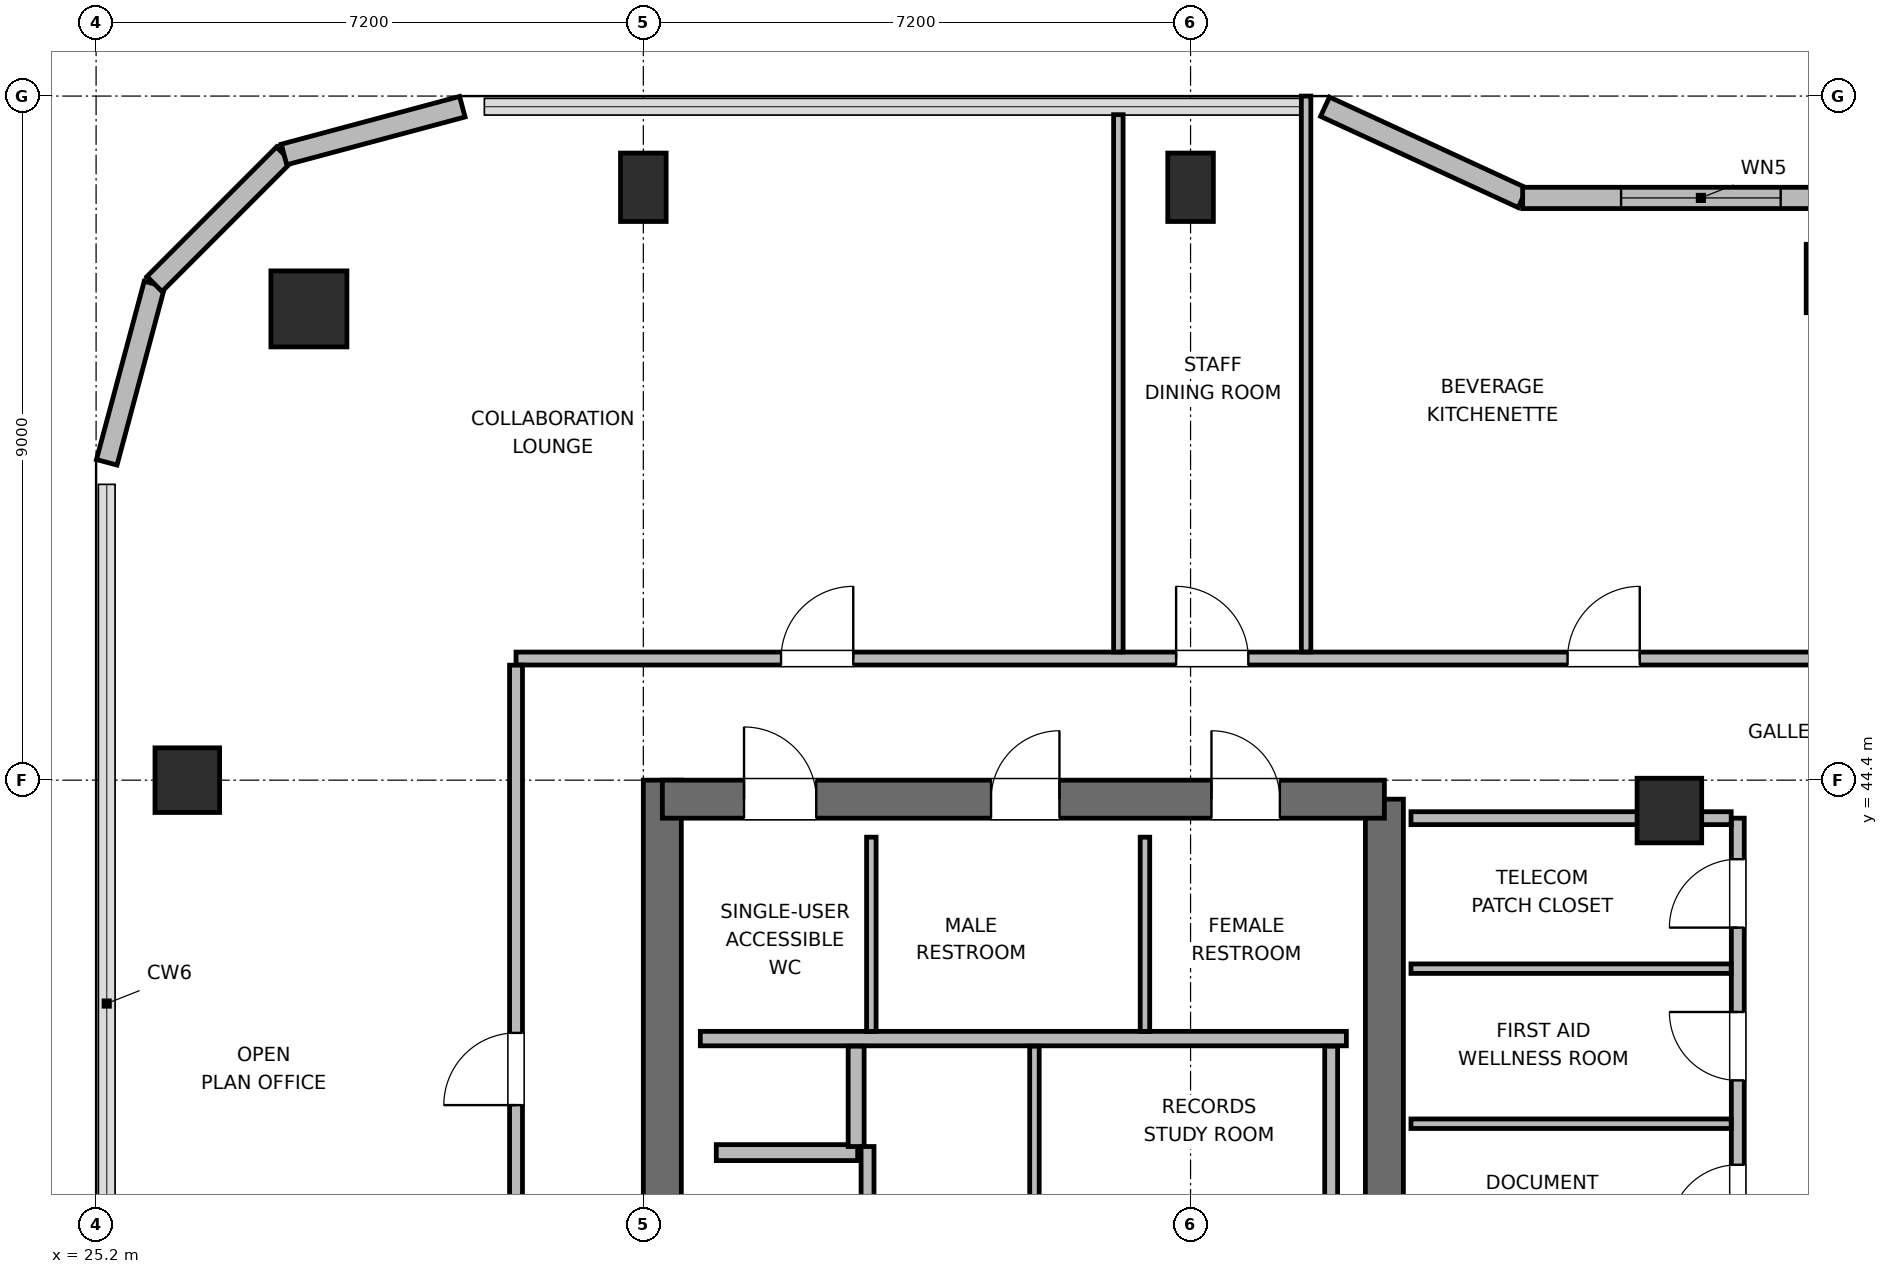
"""IFC4 building model, lengths in metres.
Left out: names, types, materials, properties, quantities, classifications, styles, units other than length and angle.
Written with IfcOpenShell. Run it as: python <this file> out.ifc"""

import sys

from ifc_helpers import new_model, si_unit, direction, frame, frame_2d, origin, origin_2d, place, context, subcontext, project, spatial, rectangle, circle, extrude, element, fill, save


model = new_model("IFC4")
c1 = context("Model", 3, precision=1e-05, world=origin(), true_north=direction((0.0, 1.0)))
c2 = subcontext(c1, "Body", "Model", "MODEL_VIEW")
j1 = project(units=[si_unit("LENGTHUNIT", "METRE"), si_unit("PLANEANGLEUNIT", "RADIAN")], contexts=[c1])
p1 = place(None, origin())
s1 = spatial("IfcSite", under=j1, at=p1, CompositionType="ELEMENT")
p2 = place(p1, origin())
s2 = spatial("IfcBuilding", under=s1, at=p2, CompositionType="ELEMENT")
p3 = place(p2, frame((0.0, 0.0, 350.4)))
s3 = spatial("IfcBuildingStorey", under=s2, at=p3, CompositionType="ELEMENT", Elevation=350.4)
p4 = place(p3, frame((32.65, 27.6, 0.0), z_axis=(0.0, 0.0, 1.0), x_axis=(0.0, 1.0, 0.0)))
e1 = element("IfcWall", 1, at=p4, inside=s3, PredefinedType="SHEAR", context=c2, shape_type="SweptSolid", body=[
    extrude(rectangle(XDim=16.8, YDim=0.5, at=frame_2d((8.4, 0.0))), origin(), (0.0, 0.0, 1.0), 4.5),
])
p5 = place(p3, frame((42.15, 37.8, 0.0), z_axis=(0.0, 0.0, 1.0), x_axis=(0.0, 1.0, 0.0)))
e2 = element("IfcWall", 2, at=p5, inside=s3, PredefinedType="SHEAR", context=c2, shape_type="SweptSolid", body=[
    extrude(rectangle(XDim=6.35, YDim=0.5, at=frame_2d((3.175, 0.0))), origin(), (0.0, 0.0, 1.0), 4.5),
])
p6 = place(p3, frame((32.65, 44.15, 0.0), z_axis=(0.0, 0.0, 1.0), x_axis=(1.0, 0.0, 0.0)))
e3 = element("IfcWall", 3, at=p6, inside=s3, PredefinedType="SHEAR", context=c2, shape_type="SweptSolid", body=[
    extrude(rectangle(XDim=9.5, YDim=0.5, at=frame_2d((4.75, 0.0))), origin(), (0.0, 0.0, 1.0), 4.5),
])
p7 = place(p6, frame((1.075, 0.0, 0.0)))
e4 = element("IfcOpeningElement", 4, at=p7, cuts=e3, PredefinedType="OPENING", context=c2, shape_type="SweptSolid", body=[
    extrude(rectangle(XDim=0.95, YDim=2.04, at=frame_2d((0.475, 1.02))), frame((0.0, 0.26, 0.0), z_axis=(0.0, -1.0, 0.0), x_axis=(1.0, 0.0, 0.0)), (0.0, 0.0, 1.0), 0.52),
])
p8 = place(p6, frame((4.325, 0.0, 0.0)))
e5 = element("IfcOpeningElement", 5, at=p8, cuts=e3, PredefinedType="OPENING", context=c2, shape_type="SweptSolid", body=[
    extrude(rectangle(XDim=0.9, YDim=2.02, at=frame_2d((0.45, 1.01))), frame((0.0, 0.26, 0.0), z_axis=(0.0, -1.0, 0.0), x_axis=(1.0, 0.0, 0.0)), (0.0, 0.0, 1.0), 0.52),
])
p9 = place(p6, frame((7.225, 0.0, 0.0)))
e6 = element("IfcOpeningElement", 6, at=p9, cuts=e3, PredefinedType="OPENING", context=c2, shape_type="SweptSolid", body=[
    extrude(rectangle(XDim=0.9, YDim=2.02, at=frame_2d((0.45, 1.01))), frame((0.0, 0.26, 0.0), z_axis=(0.0, -1.0, 0.0), x_axis=(1.0, 0.0, 0.0)), (0.0, 0.0, 1.0), 0.52),
])
p10 = place(p3, frame((28.0, 50.6, 0.0), z_axis=(0.0, 0.0, 1.0), x_axis=(1.0, 0.0, 0.0)))
e7 = element("IfcColumn", 7, at=p10, inside=s3, PredefinedType="COLUMN", context=c2, shape_type="SweptSolid", body=[
    extrude(circle(Radius=0.5, at=origin_2d()), origin(), (0.0, 0.0, 1.0), 4.5),
])
for number, where, z_axis, x_axis in (
    (8, (32.4, 52.2, 0.0), (0.0, 0.0, 1.0), (1.0, 0.0, 0.0)),
    (9, (39.6, 52.2, 0.0), (0.0, 0.0, 1.0), (1.0, 0.0, 0.0)),
    (10, (48.0, 51.0, 0.0), (0.0, 0.0, 1.0), (1.0, 0.0, 0.0)),
):
    element("IfcColumn", number, at=place(p3, frame(where, z_axis=z_axis, x_axis=x_axis)), inside=s3, PredefinedType="COLUMN", context=c2, shape_type="SweptSolid", body=[
        extrude(rectangle(XDim=0.6, YDim=0.9, at=origin_2d()), origin(), (0.0, 0.0, 1.0), 4.5),
    ])
for number, where, z_axis, x_axis in (
    (11, (26.4, 44.4, 0.0), (0.0, 0.0, 1.0), (1.0, 0.0, 0.0)),
    (12, (45.9, 44.0, 0.0), (0.0, 0.0, 1.0), (1.0, 0.0, 0.0)),
):
    element("IfcColumn", number, at=place(p3, frame(where, z_axis=z_axis, x_axis=x_axis)), inside=s3, PredefinedType="COLUMN", context=c2, shape_type="SweptSolid", body=[
        extrude(rectangle(XDim=0.85, YDim=0.85, at=origin_2d()), origin(), (0.0, 0.0, 1.0), 4.5),
    ])
p11 = place(p3, frame((25.34, 48.582, 0.0), z_axis=(0.0, 0.0, 1.0), x_axis=(0.258751159445, 0.965944013639, 0.0)))
e13 = element("IfcWall", 13, at=p11, inside=s3, PredefinedType="SOLIDWALL", context=c2, shape_type="SweptSolid", body=[
    extrude(rectangle(XDim=2.429, YDim=0.28, at=frame_2d((1.214, 0.0))), origin(), (0.0, 0.0, 1.0), 2.695),
])
p12 = place(p3, frame((25.969, 50.927, 0.0), z_axis=(0.0, 0.0, 1.0), x_axis=(0.707106781187, 0.707106781187, 0.0)))
e14 = element("IfcWall", 14, at=p12, inside=s3, PredefinedType="SOLIDWALL", context=c2, shape_type="SweptSolid", body=[
    extrude(rectangle(XDim=2.41, YDim=0.28, at=frame_2d((1.205, 0.0))), origin(), (0.0, 0.0, 1.0), 2.695),
])
p13 = place(p3, frame((27.673, 52.632, 0.0), z_axis=(0.0, 0.0, 1.0), x_axis=(0.965937282298, 0.25877628691, 0.0)))
e15 = element("IfcWall", 15, at=p13, inside=s3, PredefinedType="SOLIDWALL", context=c2, shape_type="SweptSolid", body=[
    extrude(rectangle(XDim=2.428, YDim=0.28, at=frame_2d((1.214, 0.0))), origin(), (0.0, 0.0, 1.0), 4.2),
])
p14 = place(p3, frame((41.369, 53.26, 0.0), z_axis=(0.0, 0.0, 1.0), x_axis=(0.907956889006, -0.419063584324, 0.0)))
e16 = element("IfcWall", 16, at=p14, inside=s3, PredefinedType="SOLIDWALL", context=c2, shape_type="SweptSolid", body=[
    extrude(rectangle(XDim=2.864, YDim=0.28, at=frame_2d((1.432, 0.0))), origin(), (0.0, 0.0, 1.0), 2.735),
])
p15 = place(p3, frame((43.969, 52.06, 0.0), z_axis=(0.0, 0.0, 1.0), x_axis=(1.0, 0.0, 0.0)))
e17 = element("IfcWall", 17, at=p15, inside=s3, PredefinedType="SOLIDWALL", context=c2, shape_type="SweptSolid", body=[
    extrude(rectangle(XDim=4.691, YDim=0.28, at=frame_2d((2.345, 0.0))), origin(), (0.0, 0.0, 1.0), 2.735),
])
p16 = place(p15, frame((1.295, 0.0, 0.85)))
e18 = element("IfcOpeningElement", 18, at=p16, cuts=e17, PredefinedType="OPENING", context=c2, shape_type="SweptSolid", body=[
    extrude(rectangle(XDim=2.1, YDim=1.05, at=frame_2d((1.05, 0.525))), frame((0.0, 0.15, 0.0), z_axis=(0.0, -1.0, 0.0), x_axis=(1.0, 0.0, 0.0)), (0.0, 0.0, 1.0), 0.3),
])
p17 = place(p3, frame((33.15, 41.0, 0.0), z_axis=(0.0, 0.0, 1.0), x_axis=(1.0, 0.0, 0.0)))
e19 = element("IfcWall", 19, at=p17, inside=s3, PredefinedType="PLUMBINGWALL", context=c2, shape_type="SweptSolid", body=[
    extrude(rectangle(XDim=8.5, YDim=0.19, at=frame_2d((4.25, 0.0))), origin(), (0.0, 0.0, 1.0), 4.2),
])
for number, where, z_axis, x_axis in (
    (20, (35.4, 41.095, 0.0), (0.0, 0.0, 1.0), (0.0, 1.0, 0.0)),
    (21, (39.0, 41.095, 0.0), (0.0, 0.0, 1.0), (0.0, 1.0, 0.0)),
):
    element("IfcWall", number, at=place(p3, frame(where, z_axis=z_axis, x_axis=x_axis)), inside=s3, PredefinedType="PARTITIONING", context=c2, shape_type="SweptSolid", body=[
        extrude(rectangle(XDim=2.555, YDim=0.125, at=frame_2d((1.277, 0.0))), origin(), (0.0, 0.0, 1.0), 4.2),
    ])
p18 = place(p3, frame((33.36, 39.5, 0.0), z_axis=(0.0, 0.0, 1.0), x_axis=(1.0, 0.0, 0.0)))
e22 = element("IfcWall", 22, at=p18, inside=s3, PredefinedType="PARTITIONING", context=c2, shape_type="SweptSolid", body=[
    extrude(rectangle(XDim=1.86, YDim=0.21, at=frame_2d((0.93, 0.0))), origin(), (0.0, 0.0, 1.0), 4.2),
])
p19 = place(p3, frame((35.2, 39.58, 0.0), z_axis=(0.0, 0.0, 1.0), x_axis=(0.0, 1.0, 0.0)))
e23 = element("IfcWall", 23, at=p19, inside=s3, PredefinedType="PARTITIONING", context=c2, shape_type="SweptSolid", body=[
    extrude(rectangle(XDim=1.32, YDim=0.21, at=frame_2d((0.66, 0.0))), origin(), (0.0, 0.0, 1.0), 4.2),
])
p20 = place(p3, frame((35.35, 38.087, 0.0), z_axis=(0.0, 0.0, 1.0), x_axis=(0.0, 1.0, 0.0)))
e24 = element("IfcWall", 24, at=p20, inside=s3, PredefinedType="PARTITIONING", context=c2, shape_type="SweptSolid", body=[
    extrude(rectangle(XDim=1.493, YDim=0.17, at=frame_2d((0.747, 0.0))), origin(), (0.0, 0.0, 1.0), 4.2),
])
p21 = place(p3, frame((41.45, 38.087, 0.0), z_axis=(0.0, 0.0, 1.0), x_axis=(0.0, 1.0, 0.0)))
e25 = element("IfcWall", 25, at=p21, inside=s3, PredefinedType="PARTITIONING", context=c2, shape_type="SweptSolid", body=[
    extrude(rectangle(XDim=2.813, YDim=0.17, at=frame_2d((1.406, 0.0))), origin(), (0.0, 0.0, 1.0), 4.2),
])
p22 = place(p3, frame((37.546, 38.087, 0.0), z_axis=(0.0, 0.0, 1.0), x_axis=(0.0, 1.0, 0.0)))
e26 = element("IfcWall", 26, at=p22, inside=s3, PredefinedType="PARTITIONING", context=c2, shape_type="SweptSolid", body=[
    extrude(rectangle(XDim=2.813, YDim=0.125, at=frame_2d((1.406, 0.0))), origin(), (0.0, 0.0, 1.0), 4.2),
])
p23 = place(p3, frame((46.8, 37.9, 0.0), z_axis=(0.0, 0.0, 1.0), x_axis=(0.0, 1.0, 0.0)))
e27 = element("IfcWall", 27, at=p23, inside=s3, PredefinedType="PARTITIONING", context=c2, shape_type="SweptSolid", body=[
    extrude(rectangle(XDim=6.0, YDim=0.17, at=frame_2d((3.0, 0.0))), origin(), (0.0, 0.0, 1.0), 4.2),
])
p24 = place(p23, frame((0.54, 0.0, 0.0)))
e28 = element("IfcOpeningElement", 28, at=p24, cuts=e27, PredefinedType="OPENING", context=c2, shape_type="SweptSolid", body=[
    extrude(rectangle(XDim=0.9, YDim=2.02, at=frame_2d((0.45, 1.01))), frame((0.0, 0.095, 0.0), z_axis=(0.0, -1.0, 0.0), x_axis=(1.0, 0.0, 0.0)), (0.0, 0.0, 1.0), 0.19),
])
p25 = place(p23, frame((2.55, 0.0, 0.0)))
e29 = element("IfcOpeningElement", 29, at=p25, cuts=e27, PredefinedType="OPENING", context=c2, shape_type="SweptSolid", body=[
    extrude(rectangle(XDim=0.9, YDim=2.02, at=frame_2d((0.45, 1.01))), frame((0.0, 0.095, 0.0), z_axis=(0.0, -1.0, 0.0), x_axis=(1.0, 0.0, 0.0)), (0.0, 0.0, 1.0), 0.19),
])
p26 = place(p23, frame((4.56, 0.0, 0.0)))
e30 = element("IfcOpeningElement", 30, at=p26, cuts=e27, PredefinedType="OPENING", context=c2, shape_type="SweptSolid", body=[
    extrude(rectangle(XDim=0.9, YDim=2.02, at=frame_2d((0.45, 1.01))), frame((0.0, 0.095, 0.0), z_axis=(0.0, -1.0, 0.0), x_axis=(1.0, 0.0, 0.0)), (0.0, 0.0, 1.0), 0.19),
])
p27 = place(p3, frame((42.5, 43.9, 0.0), z_axis=(0.0, 0.0, 1.0), x_axis=(1.0, 0.0, 0.0)))
e31 = element("IfcWall", 31, at=p27, inside=s3, PredefinedType="PARTITIONING", context=c2, shape_type="SweptSolid", body=[
    extrude(rectangle(XDim=4.213, YDim=0.17, at=frame_2d((2.106, 0.0))), origin(), (0.0, 0.0, 1.0), 3.285),
])
for number, where, z_axis, x_axis in (
    (32, (42.5, 39.88, 0.0), (0.0, 0.0, 1.0), (1.0, 0.0, 0.0)),
    (33, (42.5, 41.92, 0.0), (0.0, 0.0, 1.0), (1.0, 0.0, 0.0)),
):
    element("IfcWall", number, at=place(p3, frame(where, z_axis=z_axis, x_axis=x_axis)), inside=s3, PredefinedType="PARTITIONING", context=c2, shape_type="SweptSolid", body=[
        extrude(rectangle(XDim=4.213, YDim=0.125, at=frame_2d((2.106, 0.0))), origin(), (0.0, 0.0, 1.0), 4.2),
    ])
p28 = place(p3, frame((30.725, 46.0, 0.0), z_axis=(0.0, 0.0, 1.0), x_axis=(1.0, 0.0, 0.0)))
e34 = element("IfcWall", 34, at=p28, inside=s3, PredefinedType="PARTITIONING", context=c2, shape_type="SweptSolid", body=[
    extrude(rectangle(XDim=32.875, YDim=0.17, at=frame_2d((16.438, 0.0))), origin(), (0.0, 0.0, 1.0), 4.2),
])
p29 = place(p28, frame((3.487, 0.0, 0.0)))
e35 = element("IfcOpeningElement", 35, at=p29, cuts=e34, PredefinedType="OPENING", context=c2, shape_type="SweptSolid", body=[
    extrude(rectangle(XDim=0.95, YDim=2.04, at=frame_2d((0.475, 1.02))), frame((0.0, 0.095, 0.0), z_axis=(0.0, -1.0, 0.0), x_axis=(1.0, 0.0, 0.0)), (0.0, 0.0, 1.0), 0.19),
])
p30 = place(p28, frame((8.685, 0.0, 0.0)))
e36 = element("IfcOpeningElement", 36, at=p30, cuts=e34, PredefinedType="OPENING", context=c2, shape_type="SweptSolid", body=[
    extrude(rectangle(XDim=0.95, YDim=2.04, at=frame_2d((0.475, 1.02))), frame((0.0, 0.095, 0.0), z_axis=(0.0, -1.0, 0.0), x_axis=(1.0, 0.0, 0.0)), (0.0, 0.0, 1.0), 0.19),
])
p31 = place(p28, frame((13.835, 0.0, 0.0)))
e37 = element("IfcOpeningElement", 37, at=p31, cuts=e34, PredefinedType="OPENING", context=c2, shape_type="SweptSolid", body=[
    extrude(rectangle(XDim=0.95, YDim=2.04, at=frame_2d((0.475, 1.02))), frame((0.0, 0.095, 0.0), z_axis=(0.0, -1.0, 0.0), x_axis=(1.0, 0.0, 0.0)), (0.0, 0.0, 1.0), 0.19),
])
p32 = place(p28, frame((20.22, 0.0, 0.0)))
e38 = element("IfcOpeningElement", 38, at=p32, cuts=e34, PredefinedType="OPENING", context=c2, shape_type="SweptSolid", body=[
    extrude(rectangle(XDim=0.95, YDim=2.04, at=frame_2d((0.475, 1.02))), frame((0.0, 0.095, 0.0), z_axis=(0.0, -1.0, 0.0), x_axis=(1.0, 0.0, 0.0)), (0.0, 0.0, 1.0), 0.19),
])
p33 = place(p28, frame((25.71, 0.0, 0.0)))
e39 = element("IfcOpeningElement", 39, at=p33, cuts=e34, PredefinedType="OPENING", context=c2, shape_type="SweptSolid", body=[
    extrude(rectangle(XDim=0.95, YDim=2.04, at=frame_2d((0.475, 1.02))), frame((0.0, 0.095, 0.0), z_axis=(0.0, -1.0, 0.0), x_axis=(1.0, 0.0, 0.0)), (0.0, 0.0, 1.0), 0.19),
])
p34 = place(p28, frame((30.565, 0.0, 0.0)))
e40 = element("IfcOpeningElement", 40, at=p34, cuts=e34, PredefinedType="OPENING", context=c2, shape_type="SweptSolid", body=[
    extrude(rectangle(XDim=0.95, YDim=2.04, at=frame_2d((0.475, 1.02))), frame((0.0, 0.095, 0.0), z_axis=(0.0, -1.0, 0.0), x_axis=(1.0, 0.0, 0.0)), (0.0, 0.0, 1.0), 0.19),
])
p35 = place(p3, frame((30.725, 26.087, 0.0), z_axis=(0.0, 0.0, 1.0), x_axis=(0.0, 1.0, 0.0)))
e41 = element("IfcWall", 41, at=p35, inside=s3, PredefinedType="PARTITIONING", context=c2, shape_type="SweptSolid", body=[
    extrude(rectangle(XDim=19.826, YDim=0.17, at=frame_2d((9.913, 0.0))), origin(), (0.0, 0.0, 1.0), 4.2),
])
p36 = place(p35, frame((4.038, 0.0, 0.0)))
e42 = element("IfcOpeningElement", 42, at=p36, cuts=e41, PredefinedType="OPENING", context=c2, shape_type="SweptSolid", body=[
    extrude(rectangle(XDim=0.95, YDim=2.04, at=frame_2d((0.475, 1.02))), frame((0.0, 0.095, 0.0), z_axis=(0.0, -1.0, 0.0), x_axis=(1.0, 0.0, 0.0)), (0.0, 0.0, 1.0), 0.19),
])
p37 = place(p35, frame((14.038, 0.0, 0.0)))
e43 = element("IfcOpeningElement", 43, at=p37, cuts=e41, PredefinedType="OPENING", context=c2, shape_type="SweptSolid", body=[
    extrude(rectangle(XDim=0.95, YDim=2.04, at=frame_2d((0.475, 1.02))), frame((0.0, 0.095, 0.0), z_axis=(0.0, -1.0, 0.0), x_axis=(1.0, 0.0, 0.0)), (0.0, 0.0, 1.0), 0.19),
])
p38 = place(p3, frame((38.65, 46.087, 0.0), z_axis=(0.0, 0.0, 1.0), x_axis=(0.0, 1.0, 0.0)))
e44 = element("IfcWall", 44, at=p38, inside=s3, PredefinedType="PARTITIONING", context=c2, shape_type="SweptSolid", body=[
    extrude(rectangle(XDim=7.068, YDim=0.125, at=frame_2d((3.534, 0.0))), origin(), (0.0, 0.0, 1.0), 4.2),
])
p39 = place(p3, frame((41.12, 46.087, 0.0), z_axis=(0.0, 0.0, 1.0), x_axis=(0.0, 1.0, 0.0)))
e45 = element("IfcWall", 45, at=p39, inside=s3, PredefinedType="PARTITIONING", context=c2, shape_type="SweptSolid", body=[
    extrude(rectangle(XDim=7.313, YDim=0.125, at=frame_2d((3.656, 0.0))), origin(), (0.0, 0.0, 1.0), 3.523),
])
p40 = place(p16, origin())
e46 = element("IfcWindow", 46, at=p40, inside=s3, PartitioningType="SINGLE_PANEL", PredefinedType="WINDOW", context=c2, shape_type="SweptSolid", body=[
    extrude(rectangle(XDim=2.1, YDim=1.05, at=frame_2d((1.05, 0.525))), frame((0.0, 0.03, 0.0), z_axis=(0.0, -1.0, 0.0), x_axis=(1.0, 0.0, 0.0)), (0.0, 0.0, 1.0), 0.06),
])
fill(e18, e46)
p41 = place(p7, origin())
e47 = element("IfcDoor", 47, at=p41, inside=s3, OperationType="SINGLE_SWING_LEFT", PredefinedType="DOOR", context=c2, shape_type="SweptSolid", body=[
    extrude(rectangle(XDim=0.95, YDim=2.04, at=frame_2d((0.475, 1.02))), frame((0.0, 0.025, 0.0), z_axis=(0.0, -1.0, 0.0), x_axis=(1.0, 0.0, 0.0)), (0.0, 0.0, 1.0), 0.05),
])
fill(e4, e47)
p42 = place(p8, origin())
e48 = element("IfcDoor", 48, at=p42, inside=s3, OperationType="SINGLE_SWING_RIGHT", PredefinedType="DOOR", context=c2, shape_type="SweptSolid", body=[
    extrude(rectangle(XDim=0.9, YDim=2.02, at=frame_2d((0.45, 1.01))), frame((0.0, 0.025, 0.0), z_axis=(0.0, -1.0, 0.0), x_axis=(1.0, 0.0, 0.0)), (0.0, 0.0, 1.0), 0.05),
])
fill(e5, e48)
p43 = place(p9, origin())
e49 = element("IfcDoor", 49, at=p43, inside=s3, OperationType="SINGLE_SWING_LEFT", PredefinedType="DOOR", context=c2, shape_type="SweptSolid", body=[
    extrude(rectangle(XDim=0.9, YDim=2.02, at=frame_2d((0.45, 1.01))), frame((0.0, 0.025, 0.0), z_axis=(0.0, -1.0, 0.0), x_axis=(1.0, 0.0, 0.0)), (0.0, 0.0, 1.0), 0.05),
])
fill(e6, e49)
p44 = place(p24, origin())
e50 = element("IfcDoor", 50, at=p44, inside=s3, OperationType="SINGLE_SWING_LEFT", PredefinedType="DOOR", context=c2, shape_type="SweptSolid", body=[
    extrude(rectangle(XDim=0.9, YDim=2.02, at=frame_2d((0.45, 1.01))), frame((0.0, 0.025, 0.0), z_axis=(0.0, -1.0, 0.0), x_axis=(1.0, 0.0, 0.0)), (0.0, 0.0, 1.0), 0.05),
])
fill(e28, e50)
p45 = place(p25, origin())
e51 = element("IfcDoor", 51, at=p45, inside=s3, OperationType="SINGLE_SWING_RIGHT", PredefinedType="DOOR", context=c2, shape_type="SweptSolid", body=[
    extrude(rectangle(XDim=0.9, YDim=2.02, at=frame_2d((0.45, 1.01))), frame((0.0, 0.025, 0.0), z_axis=(0.0, -1.0, 0.0), x_axis=(1.0, 0.0, 0.0)), (0.0, 0.0, 1.0), 0.05),
])
fill(e29, e51)
p46 = place(p26, origin())
e52 = element("IfcDoor", 52, at=p46, inside=s3, OperationType="SINGLE_SWING_LEFT", PredefinedType="DOOR", context=c2, shape_type="SweptSolid", body=[
    extrude(rectangle(XDim=0.9, YDim=2.02, at=frame_2d((0.45, 1.01))), frame((0.0, 0.025, 0.0), z_axis=(0.0, -1.0, 0.0), x_axis=(1.0, 0.0, 0.0)), (0.0, 0.0, 1.0), 0.05),
])
fill(e30, e52)
p47 = place(p29, origin())
e53 = element("IfcDoor", 53, at=p47, inside=s3, OperationType="SINGLE_SWING_RIGHT", PredefinedType="DOOR", context=c2, shape_type="SweptSolid", body=[
    extrude(rectangle(XDim=0.95, YDim=2.04, at=frame_2d((0.475, 1.02))), frame((0.0, 0.025, 0.0), z_axis=(0.0, -1.0, 0.0), x_axis=(1.0, 0.0, 0.0)), (0.0, 0.0, 1.0), 0.05),
])
fill(e35, e53)
p48 = place(p30, origin())
e54 = element("IfcDoor", 54, at=p48, inside=s3, OperationType="SINGLE_SWING_LEFT", PredefinedType="DOOR", context=c2, shape_type="SweptSolid", body=[
    extrude(rectangle(XDim=0.95, YDim=2.04, at=frame_2d((0.475, 1.02))), frame((0.0, 0.025, 0.0), z_axis=(0.0, -1.0, 0.0), x_axis=(1.0, 0.0, 0.0)), (0.0, 0.0, 1.0), 0.05),
])
fill(e36, e54)
p49 = place(p31, origin())
e55 = element("IfcDoor", 55, at=p49, inside=s3, OperationType="SINGLE_SWING_RIGHT", PredefinedType="DOOR", context=c2, shape_type="SweptSolid", body=[
    extrude(rectangle(XDim=0.95, YDim=2.04, at=frame_2d((0.475, 1.02))), frame((0.0, 0.025, 0.0), z_axis=(0.0, -1.0, 0.0), x_axis=(1.0, 0.0, 0.0)), (0.0, 0.0, 1.0), 0.05),
])
fill(e37, e55)
p50 = place(p37, origin())
e56 = element("IfcDoor", 56, at=p50, inside=s3, OperationType="SINGLE_SWING_LEFT", PredefinedType="DOOR", context=c2, shape_type="SweptSolid", body=[
    extrude(rectangle(XDim=0.95, YDim=2.04, at=frame_2d((0.475, 1.02))), frame((0.0, 0.025, 0.0), z_axis=(0.0, -1.0, 0.0), x_axis=(1.0, 0.0, 0.0)), (0.0, 0.0, 1.0), 0.05),
])
fill(e43, e56)
save(model, sys.argv[1])
